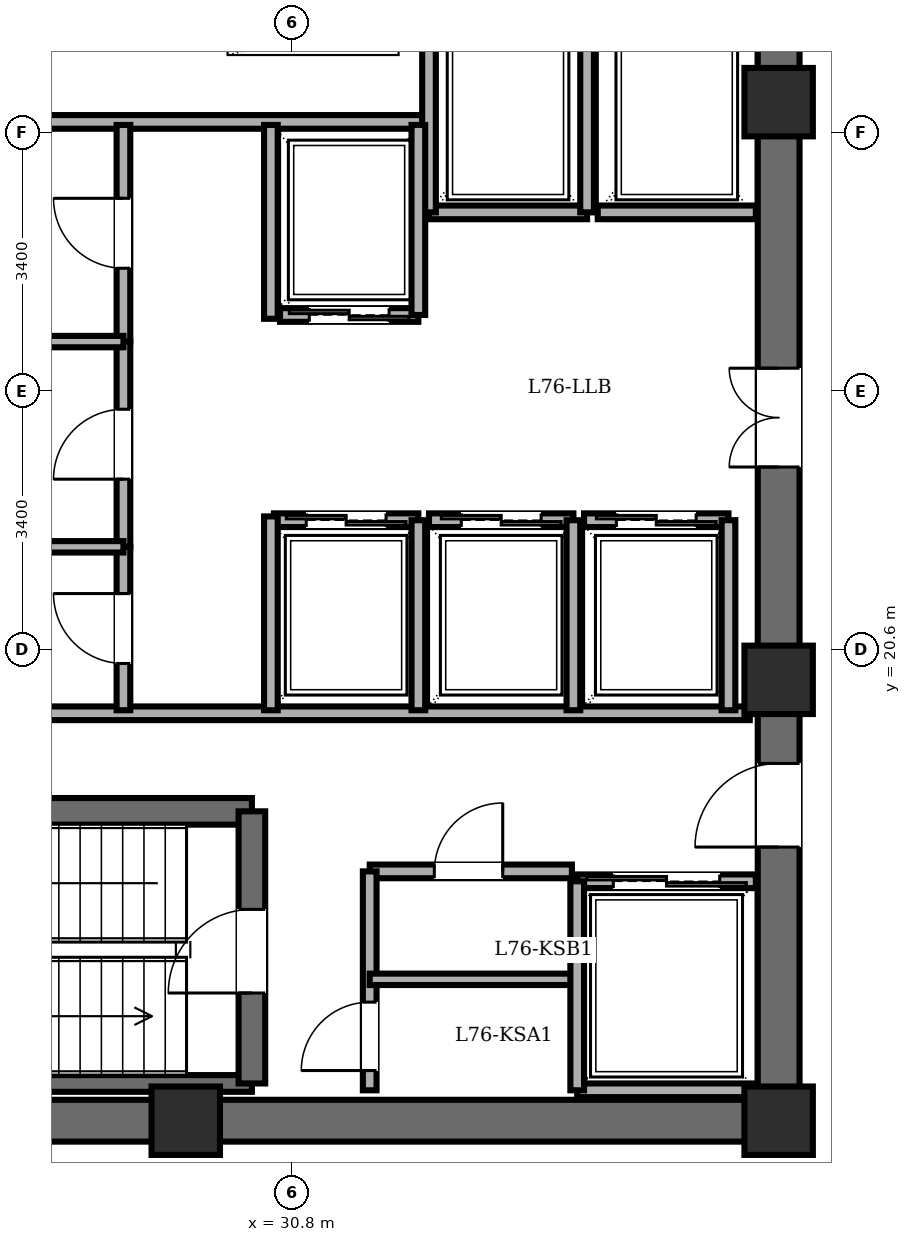
"""IFC4 building model, lengths in metres.
Left out: names, types, materials, properties, quantities, classifications, styles, units other than length and angle.
Written with IfcOpenShell. Run it as: python <this file> out.ifc"""

import sys

from ifc_helpers import new_model, si_unit, direction, frame, frame_2d, origin, origin_2d, place, context, subcontext, project, spatial, rectangle, extrude, element, fill, save


model = new_model("IFC4")
c1 = context("Model", 3, precision=1e-05, world=origin(), true_north=direction((0.0, 1.0)))
c2 = subcontext(c1, "Body", "Model", "MODEL_VIEW")
j1 = project(units=[si_unit("LENGTHUNIT", "METRE"), si_unit("PLANEANGLEUNIT", "RADIAN")], contexts=[c1])
p1 = place(None, origin())
s1 = spatial("IfcSite", under=j1, at=p1, CompositionType="ELEMENT")
p2 = place(p1, origin())
s2 = spatial("IfcBuilding", under=s1, at=p2, CompositionType="ELEMENT")
p3 = place(p2, frame((0.0, 0.0, 291.65)))
s3 = spatial("IfcBuildingStorey", under=s2, at=p3, CompositionType="ELEMENT", Elevation=291.65)
for number, where, z_axis, x_axis in (
    (1, (29.4, 14.4, 0.0), (0.0, 0.0, 1.0), (1.0, 0.0, 0.0)),
    (2, (37.2, 14.4, 0.0), (0.0, 0.0, 1.0), (1.0, 0.0, 0.0)),
    (3, (37.2, 20.2, 0.0), (0.0, 0.0, 1.0), (1.0, 0.0, 0.0)),
    (4, (37.2, 27.8, 0.0), (0.0, 0.0, 1.0), (1.0, 0.0, 0.0)),
):
    element("IfcColumn", number, at=place(p3, frame(where, z_axis=z_axis, x_axis=x_axis)), inside=s3, PredefinedType="COLUMN", context=c2, shape_type="SweptSolid", body=[
        extrude(rectangle(XDim=0.9, YDim=0.9, at=origin_2d()), origin(), (0.0, 0.0, 1.0), 3.65),
    ])
p4 = place(p3, frame((37.2, 14.4, 0.0), z_axis=(0.0, 0.0, 1.0), x_axis=(-1.0, 0.0, 0.0)))
e5 = element("IfcWall", 5, at=p4, inside=s3, PredefinedType="SHEAR", context=c2, shape_type="SweptSolid", body=[
    extrude(rectangle(XDim=15.6, YDim=0.55, at=frame_2d((7.8, 0.0))), origin(), (0.0, 0.0, 1.0), 3.41),
])
p5 = place(p3, frame((37.2, 14.4, 0.0), z_axis=(0.0, 0.0, 1.0), x_axis=(0.0, 1.0, 0.0)))
e6 = element("IfcWall", 6, at=p5, inside=s3, PredefinedType="SHEAR", context=c2, shape_type="SweptSolid", body=[
    extrude(rectangle(XDim=19.2, YDim=0.55, at=frame_2d((9.6, 0.0))), origin(), (0.0, 0.0, 1.0), 3.41),
])
p6 = place(p5, frame((15.8, 0.0, 0.0)))
e7 = element("IfcOpeningElement", 7, at=p6, cuts=e6, PredefinedType="OPENING", context=c2, shape_type="SweptSolid", body=[
    extrude(rectangle(XDim=1.15, YDim=2.15, at=frame_2d((0.575, 1.075))), frame((0.0, 0.285, 0.0), z_axis=(0.0, -1.0, 0.0), x_axis=(1.0, 0.0, 0.0)), (0.0, 0.0, 1.0), 0.57),
])
p7 = place(p5, frame((3.6, 0.0, 0.0)))
e8 = element("IfcOpeningElement", 8, at=p7, cuts=e6, PredefinedType="OPENING", context=c2, shape_type="SweptSolid", body=[
    extrude(rectangle(XDim=1.1, YDim=2.15, at=frame_2d((0.55, 1.075))), frame((0.0, 0.285, 0.0), z_axis=(0.0, -1.0, 0.0), x_axis=(1.0, 0.0, 0.0)), (0.0, 0.0, 1.0), 0.57),
])
p8 = place(p5, frame((8.6, 0.0, 0.0)))
e9 = element("IfcOpeningElement", 9, at=p8, cuts=e6, PredefinedType="OPENING", context=c2, shape_type="SweptSolid", body=[
    extrude(rectangle(XDim=1.3, YDim=2.2, at=frame_2d((0.65, 1.1))), frame((0.0, 0.285, 0.0), z_axis=(0.0, -1.0, 0.0), x_axis=(1.0, 0.0, 0.0)), (0.0, 0.0, 1.0), 0.57),
])
p9 = place(p3, frame((22.48, 18.47, 0.0), z_axis=(0.0, 0.0, 1.0), x_axis=(1.0, 0.0, 0.0)))
e10 = element("IfcWall", 10, at=p9, inside=s3, PredefinedType="SOLIDWALL", context=c2, shape_type="SweptSolid", body=[
    extrude(rectangle(XDim=7.79, YDim=0.35, at=frame_2d((3.895, 0.0))), origin(), (0.0, 0.0, 1.0), 3.41),
])
p10 = place(p3, frame((22.48, 14.89, 0.0), z_axis=(0.0, 0.0, 1.0), x_axis=(1.0, 0.0, 0.0)))
e11 = element("IfcWall", 11, at=p10, inside=s3, PredefinedType="PARTITIONING", context=c2, shape_type="SweptSolid", body=[
    extrude(rectangle(XDim=7.79, YDim=0.22, at=frame_2d((3.895, 0.0))), origin(), (0.0, 0.0, 1.0), 3.41),
])
p11 = place(p3, frame((30.27, 14.89, 0.0), z_axis=(0.0, 0.0, 1.0), x_axis=(0.0, 1.0, 0.0)))
e12 = element("IfcWall", 12, at=p11, inside=s3, PredefinedType="SOLIDWALL", context=c2, shape_type="SweptSolid", body=[
    extrude(rectangle(XDim=3.58, YDim=0.35, at=frame_2d((1.79, 0.0))), origin(), (0.0, 0.0, 1.0), 3.41),
])
p12 = place(p11, frame((1.19, 0.0, 0.0)))
e13 = element("IfcOpeningElement", 13, at=p12, cuts=e12, PredefinedType="OPENING", context=c2, shape_type="SweptSolid", body=[
    extrude(rectangle(XDim=1.1, YDim=2.15, at=frame_2d((0.55, 1.075))), frame((0.0, 0.185, 0.0), z_axis=(0.0, -1.0, 0.0), x_axis=(1.0, 0.0, 0.0)), (0.0, 0.0, 1.0), 0.37),
])
p13 = place(p3, frame((21.95, 27.54, 0.0), z_axis=(0.0, 0.0, 1.0), x_axis=(1.0, 0.0, 0.0)))
e14 = element("IfcWall", 14, at=p13, inside=s3, PredefinedType="PARTITIONING", context=c2, shape_type="SweptSolid", body=[
    extrude(rectangle(XDim=10.56, YDim=0.18, at=frame_2d((5.28, 0.0))), origin(), (0.0, 0.0, 1.0), 3.41),
])
p14 = place(p3, frame((21.95, 19.76, 0.0), z_axis=(0.0, 0.0, 1.0), x_axis=(1.0, 0.0, 0.0)))
e15 = element("IfcWall", 15, at=p14, inside=s3, PredefinedType="PARTITIONING", context=c2, shape_type="SweptSolid", body=[
    extrude(rectangle(XDim=14.87, YDim=0.18, at=frame_2d((7.435, 0.0))), origin(), (0.0, 0.0, 1.0), 3.41),
])
p15 = place(p3, frame((31.82, 17.68, 0.0), z_axis=(0.0, 0.0, 1.0), x_axis=(1.0, 0.0, 0.0)))
e16 = element("IfcWall", 16, at=p15, inside=s3, PredefinedType="PARTITIONING", context=c2, shape_type="SweptSolid", body=[
    extrude(rectangle(XDim=2.66, YDim=0.18, at=frame_2d((1.33, 0.0))), origin(), (0.0, 0.0, 1.0), 3.41),
])
p16 = place(p15, frame((0.85, 0.0, 0.0)))
e17 = element("IfcOpeningElement", 17, at=p16, cuts=e16, PredefinedType="OPENING", context=c2, shape_type="SweptSolid", body=[
    extrude(rectangle(XDim=0.9, YDim=2.05, at=frame_2d((0.45, 1.025))), frame((0.0, 0.1, 0.0), z_axis=(0.0, -1.0, 0.0), x_axis=(1.0, 0.0, 0.0)), (0.0, 0.0, 1.0), 0.2),
])
p17 = place(p3, frame((31.82, 14.8, 0.0), z_axis=(0.0, 0.0, 1.0), x_axis=(0.0, 1.0, 0.0)))
e18 = element("IfcWall", 18, at=p17, inside=s3, PredefinedType="PARTITIONING", context=c2, shape_type="SweptSolid", body=[
    extrude(rectangle(XDim=2.88, YDim=0.18, at=frame_2d((1.44, 0.0))), origin(), (0.0, 0.0, 1.0), 3.41),
])
p18 = place(p17, frame((0.26, 0.0, 0.0)))
e19 = element("IfcOpeningElement", 19, at=p18, cuts=e18, PredefinedType="OPENING", context=c2, shape_type="SweptSolid", body=[
    extrude(rectangle(XDim=0.9, YDim=2.05, at=frame_2d((0.45, 1.025))), frame((0.0, 0.1, 0.0), z_axis=(0.0, -1.0, 0.0), x_axis=(1.0, 0.0, 0.0)), (0.0, 0.0, 1.0), 0.2),
])
p19 = place(p3, frame((31.82, 16.26, 0.0), z_axis=(0.0, 0.0, 1.0), x_axis=(1.0, 0.0, 0.0)))
e20 = element("IfcWall", 20, at=p19, inside=s3, PredefinedType="PARTITIONING", context=c2, shape_type="SweptSolid", body=[
    extrude(rectangle(XDim=2.66, YDim=0.15, at=frame_2d((1.33, 0.0))), origin(), (0.0, 0.0, 1.0), 3.41),
])
p20 = place(p3, frame((34.68, 26.35, 0.0), z_axis=(0.0, 0.0, 1.0), x_axis=(-1.0, 0.0, 0.0)))
e21 = element("IfcWall", 21, at=p20, inside=s3, PredefinedType="PARTITIONING", context=c2, shape_type="SweptSolid", body=[
    extrude(rectangle(XDim=2.08, YDim=0.18, at=frame_2d((1.04, 0.0))), origin(), (0.0, 0.0, 1.0), 3.41),
])
for number, where, z_axis, x_axis in (
    (22, (34.68, 26.35, 0.0), (0.0, 0.0, 1.0), (0.0, 1.0, 0.0)),
    (23, (32.6, 29.08, 0.0), (0.0, 0.0, 1.0), (0.0, -1.0, 0.0)),
):
    element("IfcWall", number, at=place(p3, frame(where, z_axis=z_axis, x_axis=x_axis)), inside=s3, PredefinedType="PARTITIONING", context=c2, shape_type="SweptSolid", body=[
        extrude(rectangle(XDim=2.73, YDim=0.18, at=frame_2d((1.365, 0.0))), origin(), (0.0, 0.0, 1.0), 3.41),
    ])
p21 = place(p3, frame((36.9, 26.35, 0.0), z_axis=(0.0, 0.0, 1.0), x_axis=(-1.0, 0.0, 0.0)))
e24 = element("IfcWall", 24, at=p21, inside=s3, PredefinedType="PARTITIONING", context=c2, shape_type="SweptSolid", body=[
    extrude(rectangle(XDim=2.08, YDim=0.18, at=frame_2d((1.04, 0.0))), origin(), (0.0, 0.0, 1.0), 3.41),
])
p22 = place(p3, frame((34.55, 17.55, 0.0), z_axis=(0.0, 0.0, 1.0), x_axis=(1.0, 0.0, 0.0)))
e25 = element("IfcWall", 25, at=p22, inside=s3, PredefinedType="PARTITIONING", context=c2, shape_type="SweptSolid", body=[
    extrude(rectangle(XDim=2.35, YDim=0.18, at=frame_2d((1.175, 0.0))), origin(), (0.0, 0.0, 1.0), 3.41),
])
p23 = place(p22, frame((0.475, 0.0, 0.0)))
e26 = element("IfcOpeningElement", 26, at=p23, cuts=e25, PredefinedType="OPENING", context=c2, shape_type="SweptSolid", body=[
    extrude(rectangle(XDim=1.4, YDim=2.3, at=frame_2d((0.7, 1.15))), frame((0.0, 0.1, 0.0), z_axis=(0.0, -1.0, 0.0), x_axis=(1.0, 0.0, 0.0)), (0.0, 0.0, 1.0), 0.2),
])
p24 = place(p3, frame((36.9, 14.8, 0.0), z_axis=(0.0, 0.0, 1.0), x_axis=(-1.0, 0.0, 0.0)))
e27 = element("IfcWall", 27, at=p24, inside=s3, PredefinedType="PARTITIONING", context=c2, shape_type="SweptSolid", body=[
    extrude(rectangle(XDim=2.35, YDim=0.18, at=frame_2d((1.175, 0.0))), origin(), (0.0, 0.0, 1.0), 3.41),
])
p25 = place(p3, frame((34.55, 17.55, 0.0), z_axis=(0.0, 0.0, 1.0), x_axis=(0.0, -1.0, 0.0)))
e28 = element("IfcWall", 28, at=p25, inside=s3, PredefinedType="PARTITIONING", context=c2, shape_type="SweptSolid", body=[
    extrude(rectangle(XDim=2.75, YDim=0.18, at=frame_2d((1.375, 0.0))), origin(), (0.0, 0.0, 1.0), 3.41),
])
p26 = place(p3, frame((32.46, 25.0, 0.0), z_axis=(0.0, 0.0, 1.0), x_axis=(-1.0, 0.0, 0.0)))
e29 = element("IfcWall", 29, at=p26, inside=s3, PredefinedType="PARTITIONING", context=c2, shape_type="SweptSolid", body=[
    extrude(rectangle(XDim=1.82, YDim=0.18, at=frame_2d((0.91, 0.0))), origin(), (0.0, 0.0, 1.0), 3.41),
])
p27 = place(p26, frame((0.385, 0.0, 0.0)))
e30 = element("IfcOpeningElement", 30, at=p27, cuts=e29, PredefinedType="OPENING", context=c2, shape_type="SweptSolid", body=[
    extrude(rectangle(XDim=1.05, YDim=2.2, at=frame_2d((0.525, 1.1))), frame((0.0, 0.1, 0.0), z_axis=(0.0, -1.0, 0.0), x_axis=(1.0, 0.0, 0.0)), (0.0, 0.0, 1.0), 0.2),
])
p28 = place(p3, frame((32.46, 25.0, 0.0), z_axis=(0.0, 0.0, 1.0), x_axis=(0.0, 1.0, 0.0)))
e31 = element("IfcWall", 31, at=p28, inside=s3, PredefinedType="PARTITIONING", context=c2, shape_type="SweptSolid", body=[
    extrude(rectangle(XDim=2.5, YDim=0.18, at=frame_2d((1.25, 0.0))), origin(), (0.0, 0.0, 1.0), 3.41),
])
p29 = place(p3, frame((30.56, 22.3, 0.0), z_axis=(0.0, 0.0, 1.0), x_axis=(1.0, 0.0, 0.0)))
e32 = element("IfcWall", 32, at=p29, inside=s3, PredefinedType="PARTITIONING", context=c2, shape_type="SweptSolid", body=[
    extrude(rectangle(XDim=1.9, YDim=0.18, at=frame_2d((0.95, 0.0))), origin(), (0.0, 0.0, 1.0), 3.41),
])
p30 = place(p29, frame((0.425, 0.0, 0.0)))
e33 = element("IfcOpeningElement", 33, at=p30, cuts=e32, PredefinedType="OPENING", context=c2, shape_type="SweptSolid", body=[
    extrude(rectangle(XDim=1.05, YDim=2.2, at=frame_2d((0.525, 1.1))), frame((0.0, 0.1, 0.0), z_axis=(0.0, -1.0, 0.0), x_axis=(1.0, 0.0, 0.0)), (0.0, 0.0, 1.0), 0.2),
])
p31 = place(p3, frame((32.46, 19.8, 0.0), z_axis=(0.0, 0.0, 1.0), x_axis=(0.0, 1.0, 0.0)))
e34 = element("IfcWall", 34, at=p31, inside=s3, PredefinedType="PARTITIONING", context=c2, shape_type="SweptSolid", body=[
    extrude(rectangle(XDim=2.5, YDim=0.18, at=frame_2d((1.25, 0.0))), origin(), (0.0, 0.0, 1.0), 3.41),
])
p32 = place(p3, frame((32.6, 22.3, 0.0), z_axis=(0.0, 0.0, 1.0), x_axis=(1.0, 0.0, 0.0)))
e35 = element("IfcWall", 35, at=p32, inside=s3, PredefinedType="PARTITIONING", context=c2, shape_type="SweptSolid", body=[
    extrude(rectangle(XDim=1.9, YDim=0.18, at=frame_2d((0.95, 0.0))), origin(), (0.0, 0.0, 1.0), 3.41),
])
p33 = place(p32, frame((0.425, 0.0, 0.0)))
e36 = element("IfcOpeningElement", 36, at=p33, cuts=e35, PredefinedType="OPENING", context=c2, shape_type="SweptSolid", body=[
    extrude(rectangle(XDim=1.05, YDim=2.2, at=frame_2d((0.525, 1.1))), frame((0.0, 0.1, 0.0), z_axis=(0.0, -1.0, 0.0), x_axis=(1.0, 0.0, 0.0)), (0.0, 0.0, 1.0), 0.2),
])
p34 = place(p3, frame((34.5, 19.8, 0.0), z_axis=(0.0, 0.0, 1.0), x_axis=(0.0, 1.0, 0.0)))
e37 = element("IfcWall", 37, at=p34, inside=s3, PredefinedType="PARTITIONING", context=c2, shape_type="SweptSolid", body=[
    extrude(rectangle(XDim=2.5, YDim=0.18, at=frame_2d((1.25, 0.0))), origin(), (0.0, 0.0, 1.0), 3.41),
])
p35 = place(p3, frame((34.64, 22.3, 0.0), z_axis=(0.0, 0.0, 1.0), x_axis=(1.0, 0.0, 0.0)))
e38 = element("IfcWall", 38, at=p35, inside=s3, PredefinedType="PARTITIONING", context=c2, shape_type="SweptSolid", body=[
    extrude(rectangle(XDim=1.9, YDim=0.18, at=frame_2d((0.95, 0.0))), origin(), (0.0, 0.0, 1.0), 3.41),
])
p36 = place(p35, frame((0.425, 0.0, 0.0)))
e39 = element("IfcOpeningElement", 39, at=p36, cuts=e38, PredefinedType="OPENING", context=c2, shape_type="SweptSolid", body=[
    extrude(rectangle(XDim=1.05, YDim=2.2, at=frame_2d((0.525, 1.1))), frame((0.0, 0.1, 0.0), z_axis=(0.0, -1.0, 0.0), x_axis=(1.0, 0.0, 0.0)), (0.0, 0.0, 1.0), 0.2),
])
p37 = place(p3, frame((36.54, 19.8, 0.0), z_axis=(0.0, 0.0, 1.0), x_axis=(0.0, 1.0, 0.0)))
e40 = element("IfcWall", 40, at=p37, inside=s3, PredefinedType="PARTITIONING", context=c2, shape_type="SweptSolid", body=[
    extrude(rectangle(XDim=2.5, YDim=0.18, at=frame_2d((1.25, 0.0))), origin(), (0.0, 0.0, 1.0), 3.41),
])
for number, where, z_axis, x_axis in (
    (41, (30.52, 24.95, 0.0), (0.0, 0.0, 1.0), (0.0, 1.0, 0.0)),
    (42, (30.52, 19.8, 0.0), (0.0, 0.0, 1.0), (0.0, 1.0, 0.0)),
):
    element("IfcWall", number, at=place(p3, frame(where, z_axis=z_axis, x_axis=x_axis)), inside=s3, PredefinedType="PARTITIONING", context=c2, shape_type="SweptSolid", body=[
        extrude(rectangle(XDim=2.55, YDim=0.18, at=frame_2d((1.275, 0.0))), origin(), (0.0, 0.0, 1.0), 3.41),
    ])
p38 = place(p3, frame((28.58, 24.65, 0.0), z_axis=(0.0, 0.0, 1.0), x_axis=(0.0, 1.0, 0.0)))
e43 = element("IfcWall", 43, at=p38, inside=s3, PredefinedType="PARTITIONING", context=c2, shape_type="SweptSolid", body=[
    extrude(rectangle(XDim=2.85, YDim=0.18, at=frame_2d((1.425, 0.0))), origin(), (0.0, 0.0, 1.0), 3.41),
])
p39 = place(p38, frame((0.965, 0.0, 0.0)))
e44 = element("IfcOpeningElement", 44, at=p39, cuts=e43, PredefinedType="OPENING", context=c2, shape_type="SweptSolid", body=[
    extrude(rectangle(XDim=0.92, YDim=2.1, at=frame_2d((0.46, 1.05))), frame((0.0, 0.1, 0.0), z_axis=(0.0, -1.0, 0.0), x_axis=(1.0, 0.0, 0.0)), (0.0, 0.0, 1.0), 0.2),
])
p40 = place(p3, frame((28.58, 21.95, 0.0), z_axis=(0.0, 0.0, 1.0), x_axis=(0.0, 1.0, 0.0)))
e45 = element("IfcWall", 45, at=p40, inside=s3, PredefinedType="PARTITIONING", context=c2, shape_type="SweptSolid", body=[
    extrude(rectangle(XDim=2.7, YDim=0.18, at=frame_2d((1.35, 0.0))), origin(), (0.0, 0.0, 1.0), 3.41),
])
p41 = place(p40, frame((0.89, 0.0, 0.0)))
e46 = element("IfcOpeningElement", 46, at=p41, cuts=e45, PredefinedType="OPENING", context=c2, shape_type="SweptSolid", body=[
    extrude(rectangle(XDim=0.92, YDim=2.1, at=frame_2d((0.46, 1.05))), frame((0.0, 0.1, 0.0), z_axis=(0.0, -1.0, 0.0), x_axis=(1.0, 0.0, 0.0)), (0.0, 0.0, 1.0), 0.2),
])
p42 = place(p3, frame((28.58, 19.8, 0.0), z_axis=(0.0, 0.0, 1.0), x_axis=(0.0, 1.0, 0.0)))
e47 = element("IfcWall", 47, at=p42, inside=s3, PredefinedType="PARTITIONING", context=c2, shape_type="SweptSolid", body=[
    extrude(rectangle(XDim=2.15, YDim=0.18, at=frame_2d((1.075, 0.0))), origin(), (0.0, 0.0, 1.0), 3.41),
])
p43 = place(p42, frame((0.615, 0.0, 0.0)))
e48 = element("IfcOpeningElement", 48, at=p43, cuts=e47, PredefinedType="OPENING", context=c2, shape_type="SweptSolid", body=[
    extrude(rectangle(XDim=0.92, YDim=2.1, at=frame_2d((0.46, 1.05))), frame((0.0, 0.1, 0.0), z_axis=(0.0, -1.0, 0.0), x_axis=(1.0, 0.0, 0.0)), (0.0, 0.0, 1.0), 0.2),
])
for number, where, z_axis, x_axis in (
    (49, (21.95, 24.65, 0.0), (0.0, 0.0, 1.0), (1.0, 0.0, 0.0)),
    (50, (21.95, 21.95, 0.0), (0.0, 0.0, 1.0), (1.0, 0.0, 0.0)),
):
    element("IfcWall", number, at=place(p3, frame(where, z_axis=z_axis, x_axis=x_axis)), inside=s3, PredefinedType="PARTITIONING", context=c2, shape_type="SweptSolid", body=[
        extrude(rectangle(XDim=6.63, YDim=0.15, at=frame_2d((3.315, 0.0))), origin(), (0.0, 0.0, 1.0), 3.41),
    ])
p44 = place(p12, origin())
e51 = element("IfcDoor", 51, at=p44, inside=s3, OperationType="SINGLE_SWING_LEFT", PredefinedType="DOOR", context=c2, shape_type="SweptSolid", body=[
    extrude(rectangle(XDim=1.1, YDim=2.15, at=frame_2d((0.55, 1.075))), frame((0.0, 0.025, 0.0), z_axis=(0.0, -1.0, 0.0), x_axis=(1.0, 0.0, 0.0)), (0.0, 0.0, 1.0), 0.05),
])
fill(e13, e51)
p45 = place(p7, origin())
e52 = element("IfcDoor", 52, at=p45, inside=s3, OperationType="SINGLE_SWING_LEFT", PredefinedType="DOOR", context=c2, shape_type="SweptSolid", body=[
    extrude(rectangle(XDim=1.1, YDim=2.15, at=frame_2d((0.55, 1.075))), frame((0.0, 0.025, 0.0), z_axis=(0.0, -1.0, 0.0), x_axis=(1.0, 0.0, 0.0)), (0.0, 0.0, 1.0), 0.05),
])
fill(e8, e52)
p46 = place(p16, origin())
e53 = element("IfcDoor", 53, at=p46, inside=s3, OperationType="SINGLE_SWING_RIGHT", PredefinedType="DOOR", context=c2, shape_type="SweptSolid", body=[
    extrude(rectangle(XDim=0.9, YDim=2.05, at=frame_2d((0.45, 1.025))), frame((0.0, 0.025, 0.0), z_axis=(0.0, -1.0, 0.0), x_axis=(1.0, 0.0, 0.0)), (0.0, 0.0, 1.0), 0.05),
])
fill(e17, e53)
p47 = place(p18, origin())
e54 = element("IfcDoor", 54, at=p47, inside=s3, OperationType="SINGLE_SWING_LEFT", PredefinedType="DOOR", context=c2, shape_type="SweptSolid", body=[
    extrude(rectangle(XDim=0.9, YDim=2.05, at=frame_2d((0.45, 1.025))), frame((0.0, 0.025, 0.0), z_axis=(0.0, -1.0, 0.0), x_axis=(1.0, 0.0, 0.0)), (0.0, 0.0, 1.0), 0.05),
])
fill(e19, e54)
p48 = place(p23, origin())
e55 = element("IfcDoor", 55, at=p48, inside=s3, OperationType="DOUBLE_DOOR_SLIDING", PredefinedType="DOOR", context=c2, shape_type="SweptSolid", body=[
    extrude(rectangle(XDim=1.4, YDim=2.3, at=frame_2d((0.7, 1.15))), frame((0.0, 0.025, 0.0), z_axis=(0.0, -1.0, 0.0), x_axis=(1.0, 0.0, 0.0)), (0.0, 0.0, 1.0), 0.05),
])
fill(e26, e55)
p49 = place(p27, origin())
e56 = element("IfcDoor", 56, at=p49, inside=s3, OperationType="DOUBLE_DOOR_SLIDING", PredefinedType="DOOR", context=c2, shape_type="SweptSolid", body=[
    extrude(rectangle(XDim=1.05, YDim=2.2, at=frame_2d((0.525, 1.1))), frame((0.0, 0.025, 0.0), z_axis=(0.0, -1.0, 0.0), x_axis=(1.0, 0.0, 0.0)), (0.0, 0.0, 1.0), 0.05),
])
fill(e30, e56)
p50 = place(p30, origin())
e57 = element("IfcDoor", 57, at=p50, inside=s3, OperationType="DOUBLE_DOOR_SLIDING", PredefinedType="DOOR", context=c2, shape_type="SweptSolid", body=[
    extrude(rectangle(XDim=1.05, YDim=2.2, at=frame_2d((0.525, 1.1))), frame((0.0, 0.025, 0.0), z_axis=(0.0, -1.0, 0.0), x_axis=(1.0, 0.0, 0.0)), (0.0, 0.0, 1.0), 0.05),
])
fill(e33, e57)
p51 = place(p33, origin())
e58 = element("IfcDoor", 58, at=p51, inside=s3, OperationType="DOUBLE_DOOR_SLIDING", PredefinedType="DOOR", context=c2, shape_type="SweptSolid", body=[
    extrude(rectangle(XDim=1.05, YDim=2.2, at=frame_2d((0.525, 1.1))), frame((0.0, 0.025, 0.0), z_axis=(0.0, -1.0, 0.0), x_axis=(1.0, 0.0, 0.0)), (0.0, 0.0, 1.0), 0.05),
])
fill(e36, e58)
p52 = place(p36, origin())
e59 = element("IfcDoor", 59, at=p52, inside=s3, OperationType="DOUBLE_DOOR_SLIDING", PredefinedType="DOOR", context=c2, shape_type="SweptSolid", body=[
    extrude(rectangle(XDim=1.05, YDim=2.2, at=frame_2d((0.525, 1.1))), frame((0.0, 0.025, 0.0), z_axis=(0.0, -1.0, 0.0), x_axis=(1.0, 0.0, 0.0)), (0.0, 0.0, 1.0), 0.05),
])
fill(e39, e59)
p53 = place(p39, origin())
e60 = element("IfcDoor", 60, at=p53, inside=s3, OperationType="SINGLE_SWING_RIGHT", PredefinedType="DOOR", context=c2, shape_type="SweptSolid", body=[
    extrude(rectangle(XDim=0.92, YDim=2.1, at=frame_2d((0.46, 1.05))), frame((0.0, 0.025, 0.0), z_axis=(0.0, -1.0, 0.0), x_axis=(1.0, 0.0, 0.0)), (0.0, 0.0, 1.0), 0.05),
])
fill(e44, e60)
p54 = place(p41, origin())
e61 = element("IfcDoor", 61, at=p54, inside=s3, OperationType="SINGLE_SWING_LEFT", PredefinedType="DOOR", context=c2, shape_type="SweptSolid", body=[
    extrude(rectangle(XDim=0.92, YDim=2.1, at=frame_2d((0.46, 1.05))), frame((0.0, 0.025, 0.0), z_axis=(0.0, -1.0, 0.0), x_axis=(1.0, 0.0, 0.0)), (0.0, 0.0, 1.0), 0.05),
])
fill(e46, e61)
p55 = place(p43, origin())
e62 = element("IfcDoor", 62, at=p55, inside=s3, OperationType="SINGLE_SWING_RIGHT", PredefinedType="DOOR", context=c2, shape_type="SweptSolid", body=[
    extrude(rectangle(XDim=0.92, YDim=2.1, at=frame_2d((0.46, 1.05))), frame((0.0, 0.025, 0.0), z_axis=(0.0, -1.0, 0.0), x_axis=(1.0, 0.0, 0.0)), (0.0, 0.0, 1.0), 0.05),
])
fill(e48, e62)
p56 = place(p8, origin())
e63 = element("IfcDoor", 63, at=p56, inside=s3, OperationType="DOUBLE_DOOR_SINGLE_SWING", PredefinedType="DOOR", context=c2, shape_type="SweptSolid", body=[
    extrude(rectangle(XDim=1.3, YDim=2.2, at=frame_2d((0.65, 1.1))), frame((0.0, 0.025, 0.0), z_axis=(0.0, -1.0, 0.0), x_axis=(1.0, 0.0, 0.0)), (0.0, 0.0, 1.0), 0.05),
])
fill(e9, e63)
save(model, sys.argv[1])
